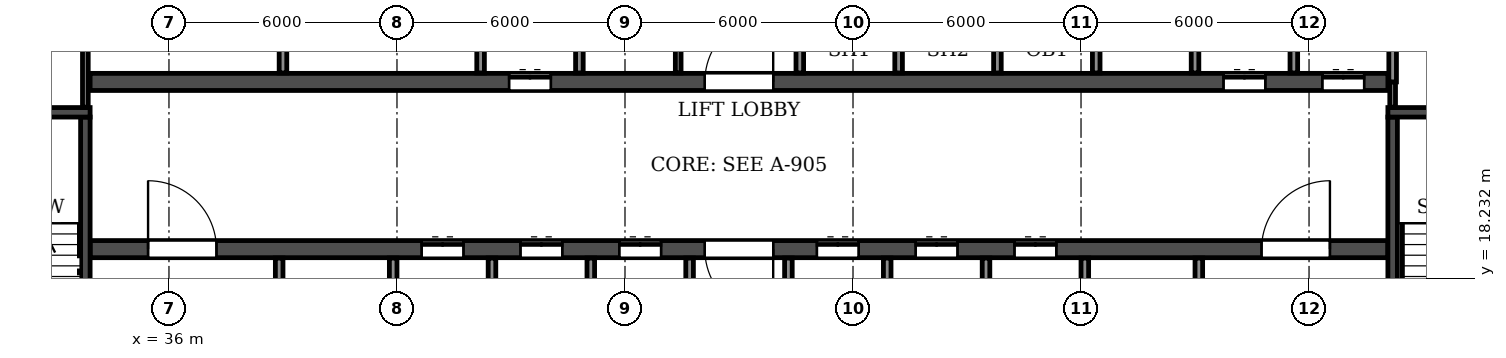
"""IFC4 building model, lengths in metres.
Left out: names, types, materials, properties, quantities, classifications, styles, units other than length and angle.
Written with IfcOpenShell. Run it as: python <this file> out.ifc"""

import sys

from ifc_helpers import new_model, si_unit, direction, frame, frame_2d, origin, place, context, subcontext, project, spatial, rectangle, extrude, element, fill, save


model = new_model("IFC4")
c1 = context("Model", 3, precision=1e-05, world=origin(), true_north=direction((0.0, 1.0)))
c2 = subcontext(c1, "Body", "Model", "MODEL_VIEW")
j1 = project(units=[si_unit("LENGTHUNIT", "METRE"), si_unit("PLANEANGLEUNIT", "RADIAN")], contexts=[c1])
p1 = place(None, origin())
s1 = spatial("IfcSite", under=j1, at=p1, CompositionType="ELEMENT")
p2 = place(p1, origin())
s2 = spatial("IfcBuilding", under=s1, at=p2, CompositionType="ELEMENT")
p3 = place(p2, frame((0.0, 0.0, 19.2)))
s3 = spatial("IfcBuildingStorey", under=s2, at=p3, CompositionType="ELEMENT", Elevation=19.2)
p4 = place(p3, frame((33.925, 19.0, 0.0), z_axis=(0.0, 0.0, 1.0), x_axis=(1.0, 0.0, 0.0)))
e1 = element("IfcWall", 1, at=p4, inside=s3, PredefinedType="SOLIDWALL", context=c2, shape_type="SweptSolid", body=[
    extrude(rectangle(XDim=34.15, YDim=0.45, at=frame_2d((17.075, 0.0))), origin(), (0.0, 0.0, 1.0), 3.95),
])
p5 = place(p4, frame((16.175, 0.0, 0.0)))
e2 = element("IfcOpeningElement", 2, at=p5, cuts=e1, PredefinedType="OPENING", context=c2, shape_type="SweptSolid", body=[
    extrude(rectangle(XDim=1.8, YDim=2.1, at=frame_2d((0.9, 1.05))), frame((0.0, 0.235, 0.0), z_axis=(0.0, -1.0, 0.0), x_axis=(1.0, 0.0, 0.0)), (0.0, 0.0, 1.0), 0.47),
])
p6 = place(p4, frame((1.525, 0.0, 0.0)))
e3 = element("IfcOpeningElement", 3, at=p6, cuts=e1, PredefinedType="OPENING", context=c2, shape_type="SweptSolid", body=[
    extrude(rectangle(XDim=1.8, YDim=2.1, at=frame_2d((0.9, 1.05))), frame((0.0, 0.235, 0.0), z_axis=(0.0, -1.0, 0.0), x_axis=(1.0, 0.0, 0.0)), (0.0, 0.0, 1.0), 0.47),
])
p7 = place(p4, frame((8.725, 0.0, 0.0)))
e4 = element("IfcOpeningElement", 4, at=p7, cuts=e1, PredefinedType="OPENING", context=c2, shape_type="SweptSolid", body=[
    extrude(rectangle(XDim=1.1, YDim=2.1, at=frame_2d((0.55, 1.05))), frame((0.0, 0.235, 0.0), z_axis=(0.0, -1.0, 0.0), x_axis=(1.0, 0.0, 0.0)), (0.0, 0.0, 1.0), 0.47),
])
p8 = place(p4, frame((11.325, 0.0, 0.0)))
e5 = element("IfcOpeningElement", 5, at=p8, cuts=e1, PredefinedType="OPENING", context=c2, shape_type="SweptSolid", body=[
    extrude(rectangle(XDim=1.1, YDim=2.1, at=frame_2d((0.55, 1.05))), frame((0.0, 0.235, 0.0), z_axis=(0.0, -1.0, 0.0), x_axis=(1.0, 0.0, 0.0)), (0.0, 0.0, 1.0), 0.47),
])
p9 = place(p4, frame((13.925, 0.0, 0.0)))
e6 = element("IfcOpeningElement", 6, at=p9, cuts=e1, PredefinedType="OPENING", context=c2, shape_type="SweptSolid", body=[
    extrude(rectangle(XDim=1.1, YDim=2.1, at=frame_2d((0.55, 1.05))), frame((0.0, 0.235, 0.0), z_axis=(0.0, -1.0, 0.0), x_axis=(1.0, 0.0, 0.0)), (0.0, 0.0, 1.0), 0.47),
])
p10 = place(p4, frame((19.125, 0.0, 0.0)))
e7 = element("IfcOpeningElement", 7, at=p10, cuts=e1, PredefinedType="OPENING", context=c2, shape_type="SweptSolid", body=[
    extrude(rectangle(XDim=1.1, YDim=2.1, at=frame_2d((0.55, 1.05))), frame((0.0, 0.235, 0.0), z_axis=(0.0, -1.0, 0.0), x_axis=(1.0, 0.0, 0.0)), (0.0, 0.0, 1.0), 0.47),
])
p11 = place(p4, frame((21.725, 0.0, 0.0)))
e8 = element("IfcOpeningElement", 8, at=p11, cuts=e1, PredefinedType="OPENING", context=c2, shape_type="SweptSolid", body=[
    extrude(rectangle(XDim=1.1, YDim=2.1, at=frame_2d((0.55, 1.05))), frame((0.0, 0.235, 0.0), z_axis=(0.0, -1.0, 0.0), x_axis=(1.0, 0.0, 0.0)), (0.0, 0.0, 1.0), 0.47),
])
p12 = place(p4, frame((24.325, 0.0, 0.0)))
e9 = element("IfcOpeningElement", 9, at=p12, cuts=e1, PredefinedType="OPENING", context=c2, shape_type="SweptSolid", body=[
    extrude(rectangle(XDim=1.1, YDim=2.1, at=frame_2d((0.55, 1.05))), frame((0.0, 0.235, 0.0), z_axis=(0.0, -1.0, 0.0), x_axis=(1.0, 0.0, 0.0)), (0.0, 0.0, 1.0), 0.47),
])
p13 = place(p4, frame((30.825, 0.0, 0.0)))
e10 = element("IfcOpeningElement", 10, at=p13, cuts=e1, PredefinedType="OPENING", context=c2, shape_type="SweptSolid", body=[
    extrude(rectangle(XDim=1.8, YDim=2.1, at=frame_2d((0.9, 1.05))), frame((0.0, 0.235, 0.0), z_axis=(0.0, -1.0, 0.0), x_axis=(1.0, 0.0, 0.0)), (0.0, 0.0, 1.0), 0.47),
])
p14 = place(p3, frame((33.925, 23.4, 0.0), z_axis=(0.0, 0.0, 1.0), x_axis=(1.0, 0.0, 0.0)))
e11 = element("IfcWall", 11, at=p14, inside=s3, PredefinedType="SOLIDWALL", context=c2, shape_type="SweptSolid", body=[
    extrude(rectangle(XDim=34.15, YDim=0.45, at=frame_2d((17.075, 0.0))), origin(), (0.0, 0.0, 1.0), 3.95),
])
p15 = place(p14, frame((16.175, 0.0, 0.0)))
e12 = element("IfcOpeningElement", 12, at=p15, cuts=e11, PredefinedType="OPENING", context=c2, shape_type="SweptSolid", body=[
    extrude(rectangle(XDim=1.8, YDim=2.1, at=frame_2d((0.9, 1.05))), frame((0.0, 0.235, 0.0), z_axis=(0.0, -1.0, 0.0), x_axis=(1.0, 0.0, 0.0)), (0.0, 0.0, 1.0), 0.47),
])
p16 = place(p14, frame((11.025, 0.0, 0.0)))
e13 = element("IfcOpeningElement", 13, at=p16, cuts=e11, PredefinedType="OPENING", context=c2, shape_type="SweptSolid", body=[
    extrude(rectangle(XDim=1.1, YDim=2.1, at=frame_2d((0.55, 1.05))), frame((0.0, 0.235, 0.0), z_axis=(0.0, -1.0, 0.0), x_axis=(1.0, 0.0, 0.0)), (0.0, 0.0, 1.0), 0.47),
])
p17 = place(p14, frame((29.825, 0.0, 0.0)))
e14 = element("IfcOpeningElement", 14, at=p17, cuts=e11, PredefinedType="OPENING", context=c2, shape_type="SweptSolid", body=[
    extrude(rectangle(XDim=1.1, YDim=2.1, at=frame_2d((0.55, 1.05))), frame((0.0, 0.235, 0.0), z_axis=(0.0, -1.0, 0.0), x_axis=(1.0, 0.0, 0.0)), (0.0, 0.0, 1.0), 0.47),
])
p18 = place(p14, frame((32.425, 0.0, 0.0)))
e15 = element("IfcOpeningElement", 15, at=p18, cuts=e11, PredefinedType="OPENING", context=c2, shape_type="SweptSolid", body=[
    extrude(rectangle(XDim=1.1, YDim=2.1, at=frame_2d((0.55, 1.05))), frame((0.0, 0.235, 0.0), z_axis=(0.0, -1.0, 0.0), x_axis=(1.0, 0.0, 0.0)), (0.0, 0.0, 1.0), 0.47),
])
p19 = place(p3, frame((33.8, 14.825, 0.0), z_axis=(0.0, 0.0, 1.0), x_axis=(0.0, 1.0, 0.0)))
e16 = element("IfcWall", 16, at=p19, inside=s3, PredefinedType="SOLIDWALL", context=c2, shape_type="SweptSolid", body=[
    extrude(rectangle(XDim=7.65, YDim=0.25, at=frame_2d((3.825, 0.0))), origin(), (0.0, 0.0, 1.0), 3.95),
])
p20 = place(p19, frame((0.475, 0.0, 0.0)))
e17 = element("IfcOpeningElement", 17, at=p20, cuts=e16, PredefinedType="OPENING", context=c2, shape_type="SweptSolid", body=[
    extrude(rectangle(XDim=1.0, YDim=2.1, at=frame_2d((0.5, 1.05))), frame((0.0, 0.135, 0.0), z_axis=(0.0, -1.0, 0.0), x_axis=(1.0, 0.0, 0.0)), (0.0, 0.0, 1.0), 0.27),
])
p21 = place(p3, frame((29.875, 22.6, 0.0), z_axis=(0.0, 0.0, 1.0), x_axis=(1.0, 0.0, 0.0)))
e18 = element("IfcWall", 18, at=p21, inside=s3, PredefinedType="SOLIDWALL", context=c2, shape_type="SweptSolid", body=[
    extrude(rectangle(XDim=4.05, YDim=0.25, at=frame_2d((2.025, 0.0))), origin(), (0.0, 0.0, 1.0), 3.95),
])
p22 = place(p3, frame((68.2, 14.825, 0.0), z_axis=(0.0, 0.0, 1.0), x_axis=(0.0, 1.0, 0.0)))
e19 = element("IfcWall", 19, at=p22, inside=s3, PredefinedType="SOLIDWALL", context=c2, shape_type="SweptSolid", body=[
    extrude(rectangle(XDim=7.65, YDim=0.25, at=frame_2d((3.825, 0.0))), origin(), (0.0, 0.0, 1.0), 3.95),
])
p23 = place(p22, frame((0.475, 0.0, 0.0)))
e20 = element("IfcOpeningElement", 20, at=p23, cuts=e19, PredefinedType="OPENING", context=c2, shape_type="SweptSolid", body=[
    extrude(rectangle(XDim=1.0, YDim=2.1, at=frame_2d((0.5, 1.05))), frame((0.0, 0.135, 0.0), z_axis=(0.0, -1.0, 0.0), x_axis=(1.0, 0.0, 0.0)), (0.0, 0.0, 1.0), 0.27),
])
p24 = place(p3, frame((68.075, 22.6, 0.0), z_axis=(0.0, 0.0, 1.0), x_axis=(1.0, 0.0, 0.0)))
e21 = element("IfcWall", 21, at=p24, inside=s3, PredefinedType="SOLIDWALL", context=c2, shape_type="SweptSolid", body=[
    extrude(rectangle(XDim=4.05, YDim=0.25, at=frame_2d((2.025, 0.0))), origin(), (0.0, 0.0, 1.0), 3.95),
])
p25 = place(p3, frame((49.4, 23.635, 0.0), z_axis=(0.0, 0.0, 1.0), x_axis=(0.0, 1.0, 0.0)))
e22 = element("IfcWall", 22, at=p25, inside=s3, PredefinedType="PARTITIONING", context=c2, shape_type="SweptSolid", body=[
    extrude(rectangle(XDim=3.93, YDim=0.15, at=frame_2d((1.965, 0.0))), origin(), (0.0, 0.0, 1.0), 3.95),
])
p26 = place(p3, frame((39.0, 23.635, 0.0), z_axis=(0.0, 0.0, 1.0), x_axis=(0.0, 1.0, 0.0)))
e23 = element("IfcWall", 23, at=p26, inside=s3, PredefinedType="PARTITIONING", context=c2, shape_type="SweptSolid", body=[
    extrude(rectangle(XDim=3.93, YDim=0.2, at=frame_2d((1.965, 0.0))), origin(), (0.0, 0.0, 1.0), 3.95),
])
p27 = place(p3, frame((33.8, 22.735, 0.0), z_axis=(0.0, 0.0, 1.0), x_axis=(0.0, 1.0, 0.0)))
e24 = element("IfcWall", 24, at=p27, inside=s3, PredefinedType="PARTITIONING", context=c2, shape_type="SweptSolid", body=[
    extrude(rectangle(XDim=4.83, YDim=0.15, at=frame_2d((2.415, 0.0))), origin(), (0.0, 0.0, 1.0), 3.95),
])
p28 = place(p3, frame((68.2, 22.735, 0.0), z_axis=(0.0, 0.0, 1.0), x_axis=(0.0, 1.0, 0.0)))
e25 = element("IfcWall", 25, at=p28, inside=s3, PredefinedType="PARTITIONING", context=c2, shape_type="SweptSolid", body=[
    extrude(rectangle(XDim=0.665, YDim=0.15, at=frame_2d((0.333, 0.0))), origin(), (0.0, 0.0, 1.0), 3.95),
])
p29 = place(p3, frame((38.9, 14.835, 0.0), z_axis=(0.0, 0.0, 1.0), x_axis=(0.0, 1.0, 0.0)))
e26 = element("IfcWall", 26, at=p29, inside=s3, PredefinedType="PARTITIONING", context=c2, shape_type="SweptSolid", body=[
    extrude(rectangle(XDim=3.93, YDim=0.2, at=frame_2d((1.965, 0.0))), origin(), (0.0, 0.0, 1.0), 3.95),
])
p30 = place(p29, frame((1.415, 0.0, 0.0)))
e27 = element("IfcOpeningElement", 27, at=p30, cuts=e26, PredefinedType="OPENING", context=c2, shape_type="SweptSolid", body=[
    extrude(rectangle(XDim=1.1, YDim=2.1, at=frame_2d((0.55, 1.05))), frame((0.0, 0.11, 0.0), z_axis=(0.0, -1.0, 0.0), x_axis=(1.0, 0.0, 0.0)), (0.0, 0.0, 1.0), 0.22),
])
for number, where, z_axis, x_axis in (
    (28, (41.9, 14.835, 0.0), (0.0, 0.0, 1.0), (0.0, 1.0, 0.0)),
    (29, (44.2, 23.635, 0.0), (0.0, 0.0, 1.0), (0.0, 1.0, 0.0)),
):
    element("IfcWall", number, at=place(p3, frame(where, z_axis=z_axis, x_axis=x_axis)), inside=s3, PredefinedType="PARTITIONING", context=c2, shape_type="SweptSolid", body=[
        extrude(rectangle(XDim=3.93, YDim=0.2, at=frame_2d((1.965, 0.0))), origin(), (0.0, 0.0, 1.0), 3.95),
    ])
p31 = place(p3, frame((44.5, 16.3, 0.0), z_axis=(0.0, 0.0, 1.0), x_axis=(0.0, 1.0, 0.0)))
e30 = element("IfcWall", 30, at=p31, inside=s3, PredefinedType="PARTITIONING", context=c2, shape_type="SweptSolid", body=[
    extrude(rectangle(XDim=2.465, YDim=0.2, at=frame_2d((1.232, 0.0))), origin(), (0.0, 0.0, 1.0), 3.95),
])
p32 = place(p3, frame((46.8, 23.635, 0.0), z_axis=(0.0, 0.0, 1.0), x_axis=(0.0, 1.0, 0.0)))
e31 = element("IfcWall", 31, at=p32, inside=s3, PredefinedType="PARTITIONING", context=c2, shape_type="SweptSolid", body=[
    extrude(rectangle(XDim=3.93, YDim=0.2, at=frame_2d((1.965, 0.0))), origin(), (0.0, 0.0, 1.0), 3.95),
])
for number, where, z_axis, x_axis in (
    (32, (47.1, 16.3, 0.0), (0.0, 0.0, 1.0), (0.0, 1.0, 0.0)),
    (33, (49.7, 16.3, 0.0), (0.0, 0.0, 1.0), (0.0, 1.0, 0.0)),
    (34, (52.3, 16.3, 0.0), (0.0, 0.0, 1.0), (0.0, 1.0, 0.0)),
):
    element("IfcWall", number, at=place(p3, frame(where, z_axis=z_axis, x_axis=x_axis)), inside=s3, PredefinedType="PARTITIONING", context=c2, shape_type="SweptSolid", body=[
        extrude(rectangle(XDim=2.465, YDim=0.2, at=frame_2d((1.232, 0.0))), origin(), (0.0, 0.0, 1.0), 3.95),
    ])
p33 = place(p3, frame((52.6, 23.635, 0.0), z_axis=(0.0, 0.0, 1.0), x_axis=(0.0, 1.0, 0.0)))
e35 = element("IfcWall", 35, at=p33, inside=s3, PredefinedType="PARTITIONING", context=c2, shape_type="SweptSolid", body=[
    extrude(rectangle(XDim=2.465, YDim=0.2, at=frame_2d((1.232, 0.0))), origin(), (0.0, 0.0, 1.0), 3.95),
])
p34 = place(p3, frame((54.9, 16.3, 0.0), z_axis=(0.0, 0.0, 1.0), x_axis=(0.0, 1.0, 0.0)))
e36 = element("IfcWall", 36, at=p34, inside=s3, PredefinedType="PARTITIONING", context=c2, shape_type="SweptSolid", body=[
    extrude(rectangle(XDim=2.465, YDim=0.2, at=frame_2d((1.232, 0.0))), origin(), (0.0, 0.0, 1.0), 3.95),
])
p35 = place(p3, frame((55.2, 23.635, 0.0), z_axis=(0.0, 0.0, 1.0), x_axis=(0.0, 1.0, 0.0)))
e37 = element("IfcWall", 37, at=p35, inside=s3, PredefinedType="PARTITIONING", context=c2, shape_type="SweptSolid", body=[
    extrude(rectangle(XDim=2.465, YDim=0.2, at=frame_2d((1.232, 0.0))), origin(), (0.0, 0.0, 1.0), 3.95),
])
p36 = place(p3, frame((57.5, 16.3, 0.0), z_axis=(0.0, 0.0, 1.0), x_axis=(0.0, 1.0, 0.0)))
e38 = element("IfcWall", 38, at=p36, inside=s3, PredefinedType="PARTITIONING", context=c2, shape_type="SweptSolid", body=[
    extrude(rectangle(XDim=2.465, YDim=0.2, at=frame_2d((1.232, 0.0))), origin(), (0.0, 0.0, 1.0), 3.95),
])
p37 = place(p3, frame((57.8, 23.635, 0.0), z_axis=(0.0, 0.0, 1.0), x_axis=(0.0, 1.0, 0.0)))
e39 = element("IfcWall", 39, at=p37, inside=s3, PredefinedType="PARTITIONING", context=c2, shape_type="SweptSolid", body=[
    extrude(rectangle(XDim=2.465, YDim=0.2, at=frame_2d((1.232, 0.0))), origin(), (0.0, 0.0, 1.0), 3.95),
])
p38 = place(p3, frame((60.1, 14.835, 0.0), z_axis=(0.0, 0.0, 1.0), x_axis=(0.0, 1.0, 0.0)))
e40 = element("IfcWall", 40, at=p38, inside=s3, PredefinedType="PARTITIONING", context=c2, shape_type="SweptSolid", body=[
    extrude(rectangle(XDim=3.93, YDim=0.2, at=frame_2d((1.965, 0.0))), origin(), (0.0, 0.0, 1.0), 3.95),
])
for number, where, z_axis, x_axis in (
    (41, (60.4, 23.635, 0.0), (0.0, 0.0, 1.0), (0.0, 1.0, 0.0)),
    (42, (63.0, 23.635, 0.0), (0.0, 0.0, 1.0), (0.0, 1.0, 0.0)),
):
    element("IfcWall", number, at=place(p3, frame(where, z_axis=z_axis, x_axis=x_axis)), inside=s3, PredefinedType="PARTITIONING", context=c2, shape_type="SweptSolid", body=[
        extrude(rectangle(XDim=2.465, YDim=0.2, at=frame_2d((1.232, 0.0))), origin(), (0.0, 0.0, 1.0), 3.95),
    ])
p39 = place(p3, frame((63.1, 14.835, 0.0), z_axis=(0.0, 0.0, 1.0), x_axis=(0.0, 1.0, 0.0)))
e43 = element("IfcWall", 43, at=p39, inside=s3, PredefinedType="PARTITIONING", context=c2, shape_type="SweptSolid", body=[
    extrude(rectangle(XDim=3.93, YDim=0.2, at=frame_2d((1.965, 0.0))), origin(), (0.0, 0.0, 1.0), 3.95),
])
p40 = place(p39, frame((1.415, 0.0, 0.0)))
e44 = element("IfcOpeningElement", 44, at=p40, cuts=e43, PredefinedType="OPENING", context=c2, shape_type="SweptSolid", body=[
    extrude(rectangle(XDim=1.1, YDim=2.1, at=frame_2d((0.55, 1.05))), frame((0.0, 0.11, 0.0), z_axis=(0.0, -1.0, 0.0), x_axis=(1.0, 0.0, 0.0)), (0.0, 0.0, 1.0), 0.22),
])
p41 = place(p3, frame((65.6, 23.635, 0.0), z_axis=(0.0, 0.0, 1.0), x_axis=(0.0, 1.0, 0.0)))
e45 = element("IfcWall", 45, at=p41, inside=s3, PredefinedType="PARTITIONING", context=c2, shape_type="SweptSolid", body=[
    extrude(rectangle(XDim=2.465, YDim=0.2, at=frame_2d((1.232, 0.0))), origin(), (0.0, 0.0, 1.0), 3.95),
])
p42 = place(p3, frame((68.2, 23.4, 0.0), z_axis=(0.0, 0.0, 1.0), x_axis=(0.0, 1.0, 0.0)))
e46 = element("IfcWall", 46, at=p42, inside=s3, PredefinedType="PARTITIONING", context=c2, shape_type="SweptSolid", body=[
    extrude(rectangle(XDim=2.7, YDim=0.2, at=frame_2d((1.35, 0.0))), origin(), (0.0, 0.0, 1.0), 3.95),
])
p43 = place(p15, origin())
e47 = element("IfcDoor", 47, at=p43, inside=s3, OperationType="DOUBLE_DOOR_SINGLE_SWING", PredefinedType="DOOR", context=c2, shape_type="SweptSolid", body=[
    extrude(rectangle(XDim=1.8, YDim=2.1, at=frame_2d((0.9, 1.05))), frame((0.0, 0.025, 0.0), z_axis=(0.0, -1.0, 0.0), x_axis=(1.0, 0.0, 0.0)), (0.0, 0.0, 1.0), 0.05),
])
fill(e12, e47)
p44 = place(p5, frame((1.8, 0.0, 0.0), z_axis=(0.0, 0.0, 1.0), x_axis=(-1.0, 0.0, 0.0)))
e48 = element("IfcDoor", 48, at=p44, inside=s3, OperationType="DOUBLE_DOOR_SINGLE_SWING", PredefinedType="DOOR", context=c2, shape_type="SweptSolid", body=[
    extrude(rectangle(XDim=1.8, YDim=2.1, at=frame_2d((0.9, 1.05))), frame((0.0, 0.025, 0.0), z_axis=(0.0, -1.0, 0.0), x_axis=(1.0, 0.0, 0.0)), (0.0, 0.0, 1.0), 0.05),
])
fill(e2, e48)
p45 = place(p6, origin())
e49 = element("IfcDoor", 49, at=p45, inside=s3, OperationType="DOUBLE_DOOR_SINGLE_SWING", PredefinedType="DOOR", context=c2, shape_type="SweptSolid", body=[
    extrude(rectangle(XDim=1.8, YDim=2.1, at=frame_2d((0.9, 1.05))), frame((0.0, 0.025, 0.0), z_axis=(0.0, -1.0, 0.0), x_axis=(1.0, 0.0, 0.0)), (0.0, 0.0, 1.0), 0.05),
])
fill(e3, e49)
p46 = place(p7, origin())
e50 = element("IfcDoor", 50, at=p46, inside=s3, OperationType="DOUBLE_DOOR_SLIDING", PredefinedType="DOOR", context=c2, shape_type="SweptSolid", body=[
    extrude(rectangle(XDim=1.1, YDim=2.1, at=frame_2d((0.55, 1.05))), frame((0.0, 0.025, 0.0), z_axis=(0.0, -1.0, 0.0), x_axis=(1.0, 0.0, 0.0)), (0.0, 0.0, 1.0), 0.05),
])
fill(e4, e50)
p47 = place(p16, origin())
e51 = element("IfcDoor", 51, at=p47, inside=s3, OperationType="DOUBLE_DOOR_SLIDING", PredefinedType="DOOR", context=c2, shape_type="SweptSolid", body=[
    extrude(rectangle(XDim=1.1, YDim=2.1, at=frame_2d((0.55, 1.05))), frame((0.0, 0.025, 0.0), z_axis=(0.0, -1.0, 0.0), x_axis=(1.0, 0.0, 0.0)), (0.0, 0.0, 1.0), 0.05),
])
fill(e13, e51)
p48 = place(p8, origin())
e52 = element("IfcDoor", 52, at=p48, inside=s3, OperationType="DOUBLE_DOOR_SLIDING", PredefinedType="DOOR", context=c2, shape_type="SweptSolid", body=[
    extrude(rectangle(XDim=1.1, YDim=2.1, at=frame_2d((0.55, 1.05))), frame((0.0, 0.025, 0.0), z_axis=(0.0, -1.0, 0.0), x_axis=(1.0, 0.0, 0.0)), (0.0, 0.0, 1.0), 0.05),
])
fill(e5, e52)
p49 = place(p9, origin())
e53 = element("IfcDoor", 53, at=p49, inside=s3, OperationType="DOUBLE_DOOR_SLIDING", PredefinedType="DOOR", context=c2, shape_type="SweptSolid", body=[
    extrude(rectangle(XDim=1.1, YDim=2.1, at=frame_2d((0.55, 1.05))), frame((0.0, 0.025, 0.0), z_axis=(0.0, -1.0, 0.0), x_axis=(1.0, 0.0, 0.0)), (0.0, 0.0, 1.0), 0.05),
])
fill(e6, e53)
p50 = place(p10, origin())
e54 = element("IfcDoor", 54, at=p50, inside=s3, OperationType="DOUBLE_DOOR_SLIDING", PredefinedType="DOOR", context=c2, shape_type="SweptSolid", body=[
    extrude(rectangle(XDim=1.1, YDim=2.1, at=frame_2d((0.55, 1.05))), frame((0.0, 0.025, 0.0), z_axis=(0.0, -1.0, 0.0), x_axis=(1.0, 0.0, 0.0)), (0.0, 0.0, 1.0), 0.05),
])
fill(e7, e54)
p51 = place(p11, origin())
e55 = element("IfcDoor", 55, at=p51, inside=s3, OperationType="DOUBLE_DOOR_SLIDING", PredefinedType="DOOR", context=c2, shape_type="SweptSolid", body=[
    extrude(rectangle(XDim=1.1, YDim=2.1, at=frame_2d((0.55, 1.05))), frame((0.0, 0.025, 0.0), z_axis=(0.0, -1.0, 0.0), x_axis=(1.0, 0.0, 0.0)), (0.0, 0.0, 1.0), 0.05),
])
fill(e8, e55)
p52 = place(p12, origin())
e56 = element("IfcDoor", 56, at=p52, inside=s3, OperationType="DOUBLE_DOOR_SLIDING", PredefinedType="DOOR", context=c2, shape_type="SweptSolid", body=[
    extrude(rectangle(XDim=1.1, YDim=2.1, at=frame_2d((0.55, 1.05))), frame((0.0, 0.025, 0.0), z_axis=(0.0, -1.0, 0.0), x_axis=(1.0, 0.0, 0.0)), (0.0, 0.0, 1.0), 0.05),
])
fill(e9, e56)
p53 = place(p17, origin())
e57 = element("IfcDoor", 57, at=p53, inside=s3, OperationType="DOUBLE_DOOR_SLIDING", PredefinedType="DOOR", context=c2, shape_type="SweptSolid", body=[
    extrude(rectangle(XDim=1.1, YDim=2.1, at=frame_2d((0.55, 1.05))), frame((0.0, 0.025, 0.0), z_axis=(0.0, -1.0, 0.0), x_axis=(1.0, 0.0, 0.0)), (0.0, 0.0, 1.0), 0.05),
])
fill(e14, e57)
p54 = place(p13, origin())
e58 = element("IfcDoor", 58, at=p54, inside=s3, OperationType="DOUBLE_DOOR_SINGLE_SWING", PredefinedType="DOOR", context=c2, shape_type="SweptSolid", body=[
    extrude(rectangle(XDim=1.8, YDim=2.1, at=frame_2d((0.9, 1.05))), frame((0.0, 0.025, 0.0), z_axis=(0.0, -1.0, 0.0), x_axis=(1.0, 0.0, 0.0)), (0.0, 0.0, 1.0), 0.05),
])
fill(e10, e58)
p55 = place(p18, origin())
e59 = element("IfcDoor", 59, at=p55, inside=s3, OperationType="DOUBLE_DOOR_SLIDING", PredefinedType="DOOR", context=c2, shape_type="SweptSolid", body=[
    extrude(rectangle(XDim=1.1, YDim=2.1, at=frame_2d((0.55, 1.05))), frame((0.0, 0.025, 0.0), z_axis=(0.0, -1.0, 0.0), x_axis=(1.0, 0.0, 0.0)), (0.0, 0.0, 1.0), 0.05),
])
fill(e15, e59)
save(model, sys.argv[1])
